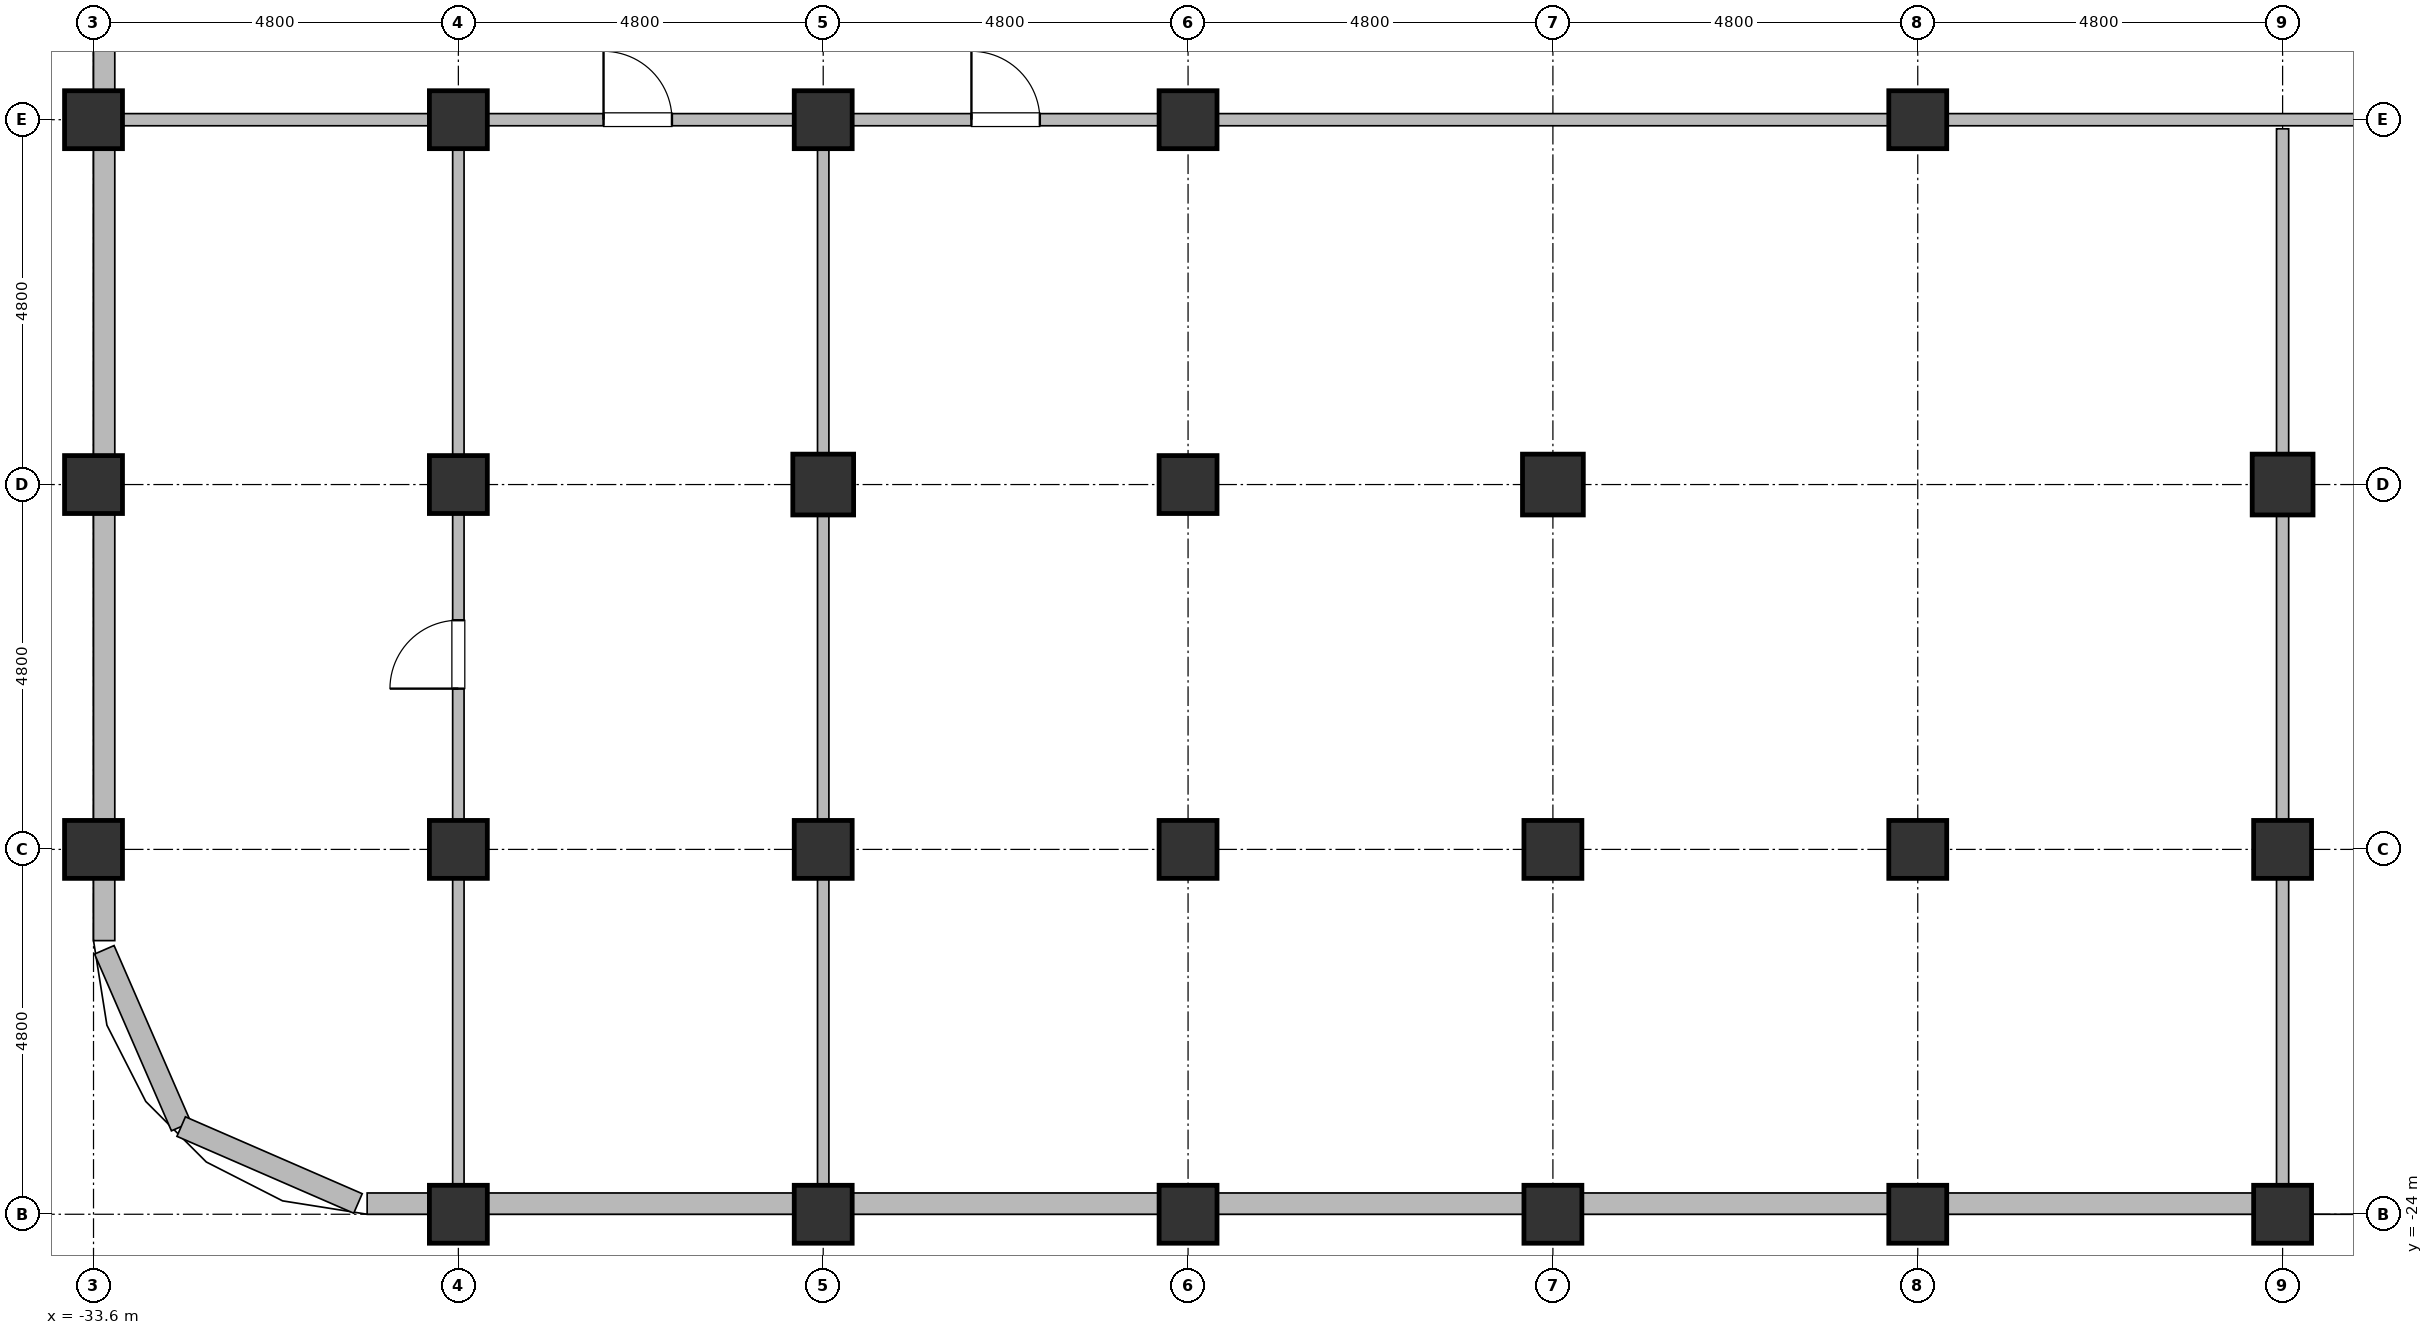
"""IFC4 building model, lengths in metres.
Left out: names, types, materials, properties, quantities, classifications, styles, units other than length and angle.
Written with IfcOpenShell. Run it as: python <this file> out.ifc"""

import sys

from ifc_helpers import new_model, si_unit, direction, frame, frame_2d, origin, origin_2d, place, context, subcontext, project, spatial, rectangle, hollow_rectangle, hollow_circle, extrude, element, fill, save


model = new_model("IFC4")
c1 = context("Model", 3, precision=1e-05, world=origin(), true_north=direction((0.0, 1.0)))
c2 = subcontext(c1, "Body", "Model", "MODEL_VIEW")
j1 = project(units=[si_unit("LENGTHUNIT", "METRE"), si_unit("PLANEANGLEUNIT", "RADIAN")], contexts=[c1])
p1 = place(None, origin())
s1 = spatial("IfcSite", under=j1, at=p1, CompositionType="ELEMENT")
p2 = place(p1, origin())
s2 = spatial("IfcBuilding", under=s1, at=p2, CompositionType="ELEMENT")
p3 = place(p2, frame((0.0, 0.0, 48.5)))
s3 = spatial("IfcBuildingStorey", under=s2, at=p3, CompositionType="ELEMENT", Elevation=48.5)
for number, where, z_axis, x_axis in (
    (1, (-33.6, -19.2, 0.0), (0.0, 0.0, 1.0), (1.0, 0.0, 0.0)),
    (2, (-33.6, -14.4, 0.0), (0.0, 0.0, 1.0), (1.0, 0.0, 0.0)),
    (3, (-33.6, -9.6, 0.0), (0.0, 0.0, 1.0), (1.0, 0.0, 0.0)),
    (4, (-28.8, -24.0, 0.0), (0.0, 0.0, 1.0), (1.0, 0.0, 0.0)),
    (5, (-28.8, -19.2, 0.0), (0.0, 0.0, 1.0), (1.0, 0.0, 0.0)),
    (6, (-28.8, -14.4, 0.0), (0.0, 0.0, 1.0), (1.0, 0.0, 0.0)),
    (7, (-28.8, -9.6, 0.0), (0.0, 0.0, 1.0), (1.0, 0.0, 0.0)),
    (8, (-24.0, -24.0, 0.0), (0.0, 0.0, 1.0), (1.0, 0.0, 0.0)),
    (9, (-24.0, -19.2, 0.0), (0.0, 0.0, 1.0), (1.0, 0.0, 0.0)),
):
    element("IfcColumn", number, at=place(p3, frame(where, z_axis=z_axis, x_axis=x_axis)), inside=s3, PredefinedType="COLUMN", context=c2, shape_type="SweptSolid", body=[
        extrude(hollow_circle(Radius=0.381, WallThickness=0.032, at=origin_2d()), origin(), (0.0, 0.0, 1.0), 3.7),
    ])
p4 = place(p3, frame((-24.0, -14.4, 0.0), z_axis=(0.0, 0.0, 1.0), x_axis=(1.0, 0.0, 0.0)))
e10 = element("IfcColumn", 10, at=p4, inside=s3, PredefinedType="COLUMN", context=c2, shape_type="SweptSolid", body=[
    extrude(hollow_rectangle(XDim=0.8, YDim=0.8, WallThickness=0.036, at=origin_2d()), origin(), (0.0, 0.0, 1.0), 3.7),
])
for number, where, z_axis, x_axis in (
    (11, (-24.0, -9.6, 0.0), (0.0, 0.0, 1.0), (1.0, 0.0, 0.0)),
    (12, (-19.2, -24.0, 0.0), (0.0, 0.0, 1.0), (1.0, 0.0, 0.0)),
    (13, (-19.2, -19.2, 0.0), (0.0, 0.0, 1.0), (1.0, 0.0, 0.0)),
    (14, (-19.2, -14.4, 0.0), (0.0, 0.0, 1.0), (1.0, 0.0, 0.0)),
    (15, (-19.2, -9.6, 0.0), (0.0, 0.0, 1.0), (1.0, 0.0, 0.0)),
    (16, (-14.4, -24.0, 0.0), (0.0, 0.0, 1.0), (1.0, 0.0, 0.0)),
    (17, (-14.4, -19.2, 0.0), (0.0, 0.0, 1.0), (1.0, 0.0, 0.0)),
):
    element("IfcColumn", number, at=place(p3, frame(where, z_axis=z_axis, x_axis=x_axis)), inside=s3, PredefinedType="COLUMN", context=c2, shape_type="SweptSolid", body=[
        extrude(hollow_circle(Radius=0.381, WallThickness=0.032, at=origin_2d()), origin(), (0.0, 0.0, 1.0), 3.7),
    ])
p5 = place(p3, frame((-14.4, -14.4, 0.0), z_axis=(0.0, 0.0, 1.0), x_axis=(1.0, 0.0, 0.0)))
e18 = element("IfcColumn", 18, at=p5, inside=s3, PredefinedType="COLUMN", context=c2, shape_type="SweptSolid", body=[
    extrude(hollow_rectangle(XDim=0.8, YDim=0.8, WallThickness=0.036, at=origin_2d()), origin(), (0.0, 0.0, 1.0), 3.7),
])
for number, where, z_axis, x_axis in (
    (19, (-9.6, -24.0, 0.0), (0.0, 0.0, 1.0), (1.0, 0.0, 0.0)),
    (20, (-9.6, -19.2, 0.0), (0.0, 0.0, 1.0), (1.0, 0.0, 0.0)),
    (21, (-9.6, -9.6, 0.0), (0.0, 0.0, 1.0), (1.0, 0.0, 0.0)),
    (22, (-4.8, -24.0, 0.0), (0.0, 0.0, 1.0), (1.0, 0.0, 0.0)),
    (23, (-4.8, -19.2, 0.0), (0.0, 0.0, 1.0), (1.0, 0.0, 0.0)),
):
    element("IfcColumn", number, at=place(p3, frame(where, z_axis=z_axis, x_axis=x_axis)), inside=s3, PredefinedType="COLUMN", context=c2, shape_type="SweptSolid", body=[
        extrude(hollow_circle(Radius=0.381, WallThickness=0.032, at=origin_2d()), origin(), (0.0, 0.0, 1.0), 3.7),
    ])
p6 = place(p3, frame((-4.8, -14.4, 0.0), z_axis=(0.0, 0.0, 1.0), x_axis=(1.0, 0.0, 0.0)))
e24 = element("IfcColumn", 24, at=p6, inside=s3, PredefinedType="COLUMN", context=c2, shape_type="SweptSolid", body=[
    extrude(hollow_rectangle(XDim=0.8, YDim=0.8, WallThickness=0.036, at=origin_2d()), origin(), (0.0, 0.0, 1.0), 3.7),
])
p7 = place(p3, frame((-33.458, -20.521, 0.0), z_axis=(0.0, 0.0, 1.0), x_axis=(0.398792985289, -0.917040977756, 0.0)))
e25 = element("IfcWall", 25, at=p7, inside=s3, PredefinedType="SOLIDWALL", context=c2, shape_type="SweptSolid", body=[
    extrude(rectangle(XDim=2.536, YDim=0.28, at=frame_2d((1.268, 0.0))), origin(), (0.0, 0.0, 1.0), 2.12),
])
p8 = place(p3, frame((-32.447, -22.847, 0.0), z_axis=(0.0, 0.0, 1.0), x_axis=(0.917060872934, -0.398747232384, 0.0)))
e26 = element("IfcWall", 26, at=p8, inside=s3, PredefinedType="SOLIDWALL", context=c2, shape_type="SweptSolid", body=[
    extrude(rectangle(XDim=2.536, YDim=0.28, at=frame_2d((1.268, 0.0))), origin(), (0.0, 0.0, 1.0), 2.12),
])
p9 = place(p3, frame((-30.0, -23.86, 0.0), z_axis=(0.0, 0.0, 1.0), x_axis=(1.0, 0.0, 0.0)))
e27 = element("IfcWall", 27, at=p9, inside=s3, PredefinedType="SOLIDWALL", context=c2, shape_type="SweptSolid", body=[
    extrude(rectangle(XDim=25.25, YDim=0.28, at=frame_2d((12.625, 0.0))), origin(), (0.0, 0.0, 1.0), 2.12),
])
p10 = place(p9, frame((11.798, 0.0, 0.75)))
e28 = element("IfcOpeningElement", 28, at=p10, cuts=e27, PredefinedType="OPENING", context=c2, shape_type="SweptSolid", body=[
    extrude(rectangle(XDim=1.8, YDim=1.15, at=frame_2d((0.9, 0.575))), frame((0.0, 0.155, 0.0), z_axis=(0.0, -1.0, 0.0), x_axis=(1.0, 0.0, 0.0)), (0.0, 0.0, 1.0), 0.31),
])
p11 = place(p3, frame((-33.46, -20.4, 0.0), z_axis=(0.0, 0.0, 1.0), x_axis=(0.0, 1.0, 0.0)))
e29 = element("IfcWall", 29, at=p11, inside=s3, PredefinedType="SOLIDWALL", context=c2, shape_type="SweptSolid", body=[
    extrude(rectangle(XDim=20.38, YDim=0.28, at=frame_2d((10.19, 0.0))), origin(), (0.0, 0.0, 1.0), 2.12),
])
p12 = place(p3, frame((-33.31, -9.6, 0.0), z_axis=(0.0, 0.0, 1.0), x_axis=(1.0, 0.0, 0.0)))
e30 = element("IfcWall", 30, at=p12, inside=s3, PredefinedType="PARTITIONING", context=c2, shape_type="SweptSolid", body=[
    extrude(rectangle(XDim=61.82, YDim=0.16, at=frame_2d((30.91, 0.0))), origin(), (0.0, 0.0, 1.0), 2.62),
])
p13 = place(p12, frame((6.42, 0.0, 0.0)))
e31 = element("IfcOpeningElement", 31, at=p13, cuts=e30, PredefinedType="OPENING", context=c2, shape_type="SweptSolid", body=[
    extrude(rectangle(XDim=0.9, YDim=2.1, at=frame_2d((0.45, 1.05))), frame((0.0, 0.095, 0.0), z_axis=(0.0, -1.0, 0.0), x_axis=(1.0, 0.0, 0.0)), (0.0, 0.0, 1.0), 0.19),
])
p14 = place(p12, frame((54.5, 0.0, 0.0)))
e32 = element("IfcOpeningElement", 32, at=p14, cuts=e30, PredefinedType="OPENING", context=c2, shape_type="SweptSolid", body=[
    extrude(rectangle(XDim=0.9, YDim=2.1, at=frame_2d((0.45, 1.05))), frame((0.0, 0.095, 0.0), z_axis=(0.0, -1.0, 0.0), x_axis=(1.0, 0.0, 0.0)), (0.0, 0.0, 1.0), 0.19),
])
p15 = place(p12, frame((11.26, 0.0, 0.0)))
e33 = element("IfcOpeningElement", 33, at=p15, cuts=e30, PredefinedType="OPENING", context=c2, shape_type="SweptSolid", body=[
    extrude(rectangle(XDim=0.9, YDim=2.1, at=frame_2d((0.45, 1.05))), frame((0.0, 0.095, 0.0), z_axis=(0.0, -1.0, 0.0), x_axis=(1.0, 0.0, 0.0)), (0.0, 0.0, 1.0), 0.19),
])
p16 = place(p12, frame((30.425, 0.0, 0.0)))
e34 = element("IfcOpeningElement", 34, at=p16, cuts=e30, PredefinedType="OPENING", context=c2, shape_type="SweptSolid", body=[
    extrude(rectangle(XDim=1.05, YDim=2.2, at=frame_2d((0.525, 1.1))), frame((0.0, 0.095, 0.0), z_axis=(0.0, -1.0, 0.0), x_axis=(1.0, 0.0, 0.0)), (0.0, 0.0, 1.0), 0.19),
])
p17 = place(p12, frame((40.62, 0.0, 0.0)))
e35 = element("IfcOpeningElement", 35, at=p17, cuts=e30, PredefinedType="OPENING", context=c2, shape_type="SweptSolid", body=[
    extrude(rectangle(XDim=0.92, YDim=2.15, at=frame_2d((0.46, 1.075))), frame((0.0, 0.095, 0.0), z_axis=(0.0, -1.0, 0.0), x_axis=(1.0, 0.0, 0.0)), (0.0, 0.0, 1.0), 0.19),
])
p18 = place(p12, frame((44.28, 0.0, 0.0)))
e36 = element("IfcOpeningElement", 36, at=p18, cuts=e30, PredefinedType="OPENING", context=c2, shape_type="SweptSolid", body=[
    extrude(rectangle(XDim=0.92, YDim=2.15, at=frame_2d((0.46, 1.075))), frame((0.0, 0.095, 0.0), z_axis=(0.0, -1.0, 0.0), x_axis=(1.0, 0.0, 0.0)), (0.0, 0.0, 1.0), 0.19),
])
p19 = place(p12, frame((50.22, 0.0, 0.0)))
e37 = element("IfcOpeningElement", 37, at=p19, cuts=e30, PredefinedType="OPENING", context=c2, shape_type="SweptSolid", body=[
    extrude(rectangle(XDim=0.92, YDim=2.15, at=frame_2d((0.46, 1.075))), frame((0.0, 0.095, 0.0), z_axis=(0.0, -1.0, 0.0), x_axis=(1.0, 0.0, 0.0)), (0.0, 0.0, 1.0), 0.19),
])
p20 = place(p3, frame((-28.8, -23.71, 0.0), z_axis=(0.0, 0.0, 1.0), x_axis=(0.0, 1.0, 0.0)))
e38 = element("IfcWall", 38, at=p20, inside=s3, PredefinedType="PARTITIONING", context=c2, shape_type="SweptSolid", body=[
    extrude(rectangle(XDim=13.99, YDim=0.15, at=frame_2d((6.995, 0.0))), origin(), (0.0, 0.0, 1.0), 2.12),
])
p21 = place(p20, frame((6.625, 0.0, 0.0)))
e39 = element("IfcOpeningElement", 39, at=p21, cuts=e38, PredefinedType="OPENING", context=c2, shape_type="SweptSolid", body=[
    extrude(rectangle(XDim=0.9, YDim=2.02, at=frame_2d((0.45, 1.01))), frame((0.0, 0.09, 0.0), z_axis=(0.0, -1.0, 0.0), x_axis=(1.0, 0.0, 0.0)), (0.0, 0.0, 1.0), 0.18),
])
p22 = place(p3, frame((-24.0, -23.71, 0.0), z_axis=(0.0, 0.0, 1.0), x_axis=(0.0, 1.0, 0.0)))
e40 = element("IfcWall", 40, at=p22, inside=s3, PredefinedType="PARTITIONING", context=c2, shape_type="SweptSolid", body=[
    extrude(rectangle(XDim=13.99, YDim=0.15, at=frame_2d((6.995, 0.0))), origin(), (0.0, 0.0, 1.0), 2.62),
])
p23 = place(p3, frame((-4.8, -23.71, 0.0), z_axis=(0.0, 0.0, 1.0), x_axis=(0.0, 1.0, 0.0)))
e41 = element("IfcWall", 41, at=p23, inside=s3, PredefinedType="PARTITIONING", context=c2, shape_type="SweptSolid", body=[
    extrude(rectangle(XDim=13.99, YDim=0.16, at=frame_2d((6.995, 0.0))), origin(), (0.0, 0.0, 1.0), 2.62),
])
p24 = place(p10, origin())
e42 = element("IfcWindow", 42, at=p24, inside=s3, PartitioningType="SINGLE_PANEL", PredefinedType="WINDOW", context=c2, shape_type="SweptSolid", body=[
    extrude(rectangle(XDim=1.8, YDim=1.15, at=frame_2d((0.9, 0.575))), frame((0.0, 0.03, 0.0), z_axis=(0.0, -1.0, 0.0), x_axis=(1.0, 0.0, 0.0)), (0.0, 0.0, 1.0), 0.06),
])
fill(e28, e42)
p25 = place(p21, origin())
e43 = element("IfcDoor", 43, at=p25, inside=s3, OperationType="SINGLE_SWING_RIGHT", PredefinedType="DOOR", context=c2, shape_type="SweptSolid", body=[
    extrude(rectangle(XDim=0.9, YDim=2.02, at=frame_2d((0.45, 1.01))), frame((0.0, 0.025, 0.0), z_axis=(0.0, -1.0, 0.0), x_axis=(1.0, 0.0, 0.0)), (0.0, 0.0, 1.0), 0.05),
])
fill(e39, e43)
p26 = place(p13, origin())
e44 = element("IfcDoor", 44, at=p26, inside=s3, OperationType="SINGLE_SWING_RIGHT", PredefinedType="DOOR", context=c2, shape_type="SweptSolid", body=[
    extrude(rectangle(XDim=0.9, YDim=2.1, at=frame_2d((0.45, 1.05))), frame((0.0, 0.025, 0.0), z_axis=(0.0, -1.0, 0.0), x_axis=(1.0, 0.0, 0.0)), (0.0, 0.0, 1.0), 0.05),
])
fill(e31, e44)
p27 = place(p15, origin())
e45 = element("IfcDoor", 45, at=p27, inside=s3, OperationType="SINGLE_SWING_LEFT", PredefinedType="DOOR", context=c2, shape_type="SweptSolid", body=[
    extrude(rectangle(XDim=0.9, YDim=2.1, at=frame_2d((0.45, 1.05))), frame((0.0, 0.025, 0.0), z_axis=(0.0, -1.0, 0.0), x_axis=(1.0, 0.0, 0.0)), (0.0, 0.0, 1.0), 0.05),
])
fill(e33, e45)
save(model, sys.argv[1])
